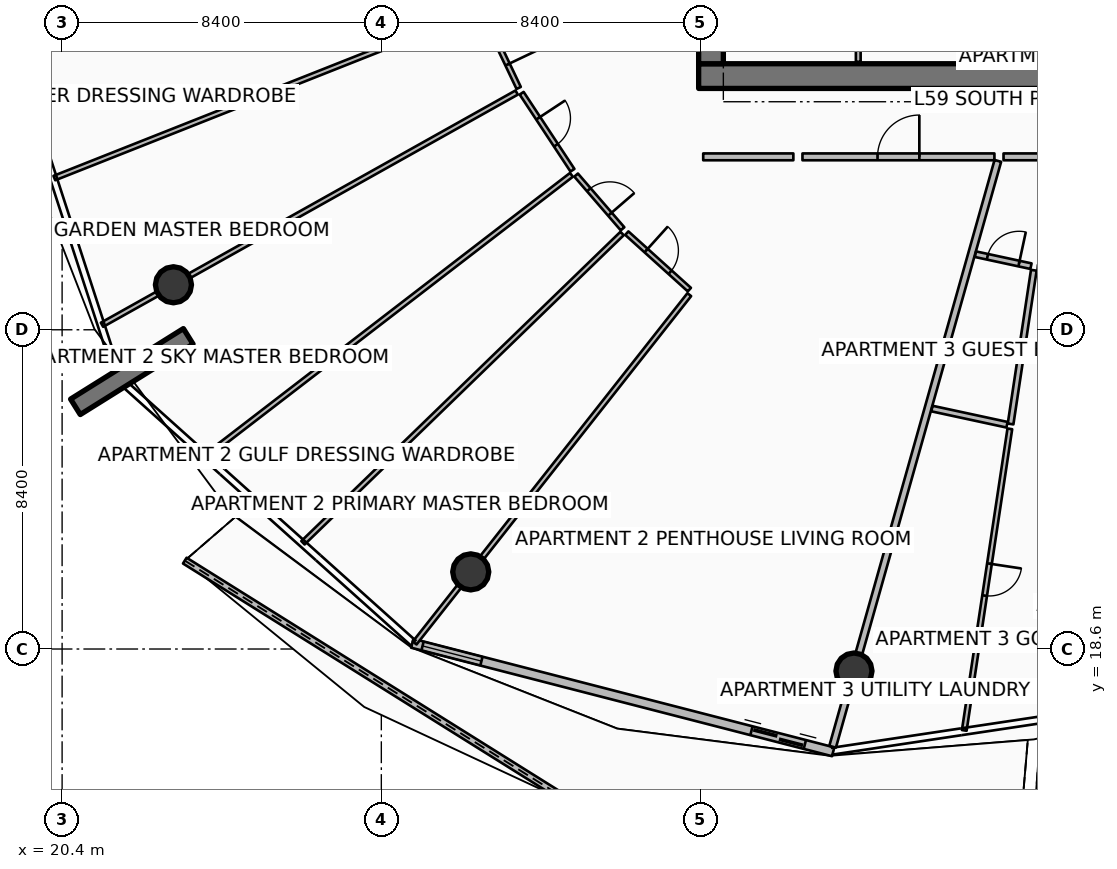
"""IFC4 building model, lengths in metres.
Left out: names, types, materials, properties, quantities, classifications, styles, units other than length and angle.
Written with IfcOpenShell. Run it as: python <this file> out.ifc"""

import sys

from ifc_helpers import new_model, si_unit, direction, frame, frame_2d, origin, origin_2d, place, context, subcontext, project, spatial, polyline, rectangle, circle, outline, extrude, element, fill, save


model = new_model("IFC4")
c1 = context("Model", 3, precision=1e-05, world=origin(), true_north=direction((0.0, 1.0)))
c2 = subcontext(c1, "Body", "Model", "MODEL_VIEW")
j1 = project(units=[si_unit("LENGTHUNIT", "METRE"), si_unit("PLANEANGLEUNIT", "RADIAN")], contexts=[c1])
p1 = place(None, origin())
s1 = spatial("IfcSite", under=j1, at=p1, CompositionType="ELEMENT")
p2 = place(p1, origin())
s2 = spatial("IfcBuilding", under=s1, at=p2, CompositionType="ELEMENT")
p3 = place(p2, frame((0.0, 0.0, 236.7)))
s3 = spatial("IfcBuildingStorey", under=s2, at=p3, CompositionType="ELEMENT", Elevation=236.7)
p4 = place(p3, frame((37.15, 33.675, 0.0), z_axis=(0.0, 0.0, 1.0), x_axis=(1.0, 0.0, 0.0)))
e1 = element("IfcWall", 1, at=p4, inside=s3, PredefinedType="SHEAR", context=c2, shape_type="SweptSolid", body=[
    extrude(rectangle(XDim=9.75, YDim=0.65, at=frame_2d((4.875, 0.0))), origin(), (0.0, 0.0, 1.0), 3.85),
])
p5 = place(p3, frame((37.475, 34.0, 0.0), z_axis=(0.0, 0.0, 1.0), x_axis=(0.0, 1.0, 0.0)))
e2 = element("IfcWall", 2, at=p5, inside=s3, PredefinedType="SHEAR", context=c2, shape_type="SweptSolid", body=[
    extrude(rectangle(XDim=16.0, YDim=0.65, at=frame_2d((8.0, 0.0))), origin(), (0.0, 0.0, 1.0), 3.85),
])
p6 = place(p3, frame((23.719, 26.827, 0.0), z_axis=(0.0, 0.0, 1.0), x_axis=(-0.848033572426, -0.529942506352, 0.0)))
e3 = element("IfcWall", 3, at=p6, inside=s3, PredefinedType="SOLIDWALL", context=c2, shape_type="SweptSolid", body=[
    extrude(rectangle(XDim=3.5, YDim=0.48, at=frame_2d((1.75, 0.0))), origin(), (0.0, 0.0, 1.0), 3.85),
])
for number, where, z_axis, x_axis in (
    (4, (23.33, 28.184, 0.0), (0.0, 0.0, 1.0), (1.0, 0.0, 0.0)),
    (5, (31.153, 20.629, 0.0), (0.0, 0.0, 1.0), (1.0, 0.0, 0.0)),
    (6, (41.237, 18.021, 0.0), (0.0, 0.0, 1.0), (1.0, 0.0, 0.0)),
):
    element("IfcColumn", number, at=place(p3, frame(where, z_axis=z_axis, x_axis=x_axis)), inside=s3, PredefinedType="COLUMN", context=c2, shape_type="SweptSolid", body=[
        extrude(circle(Radius=0.475, at=origin_2d()), origin(), (0.0, 0.0, 1.0), 3.59),
    ])
p7 = place(p3, frame((23.629, 20.926, 0.0), z_axis=(0.0, 0.0, 1.0), x_axis=(0.847743764475, -0.53040598582, 0.0)))
e7 = element("IfcWall", 7, at=p7, inside=s3, PredefinedType="PARAPET", context=c2, shape_type="SweptSolid", body=[
    extrude(outline(polyline([(0.0, 0.0), (12.075, 0.0), (12.075, 1.632), (6.037, 1.418), (0.0, 1.233), (0.0, 0.0)])), frame((0.0, 0.09, 0.0), z_axis=(0.0, -1.0, 0.0), x_axis=(1.0, 0.0, 0.0)), (0.0, 0.0, 1.0), 0.18),
])
p8 = place(p3, frame((45.942, 13.635, 0.0), z_axis=(0.0, 0.0, 1.0), x_axis=(0.962462930889, 0.271413165976, 0.0)))
e8 = element("IfcWall", 8, at=p8, inside=s3, PredefinedType="PARAPET", context=c2, shape_type="SweptSolid", body=[
    extrude(outline(polyline([(0.0, 0.0), (10.611, 0.0), (10.611, 1.632), (5.305, 1.798), (0.0, 1.86), (0.0, 0.0)])), frame((0.0, 0.09, 0.0), z_axis=(0.0, -1.0, 0.0), x_axis=(1.0, 0.0, 0.0)), (0.0, 0.0, 1.0), 0.18),
])
p9 = place(p3, frame((29.614, 18.751, 0.0), z_axis=(0.0, 0.0, 1.0), x_axis=(0.968343758421, -0.249620442927, 0.0)))
e9 = element("IfcWall", 9, at=p9, inside=s3, PredefinedType="SOLIDWALL", context=c2, shape_type="SweptSolid", body=[
    extrude(rectangle(XDim=11.438, YDim=0.24, at=frame_2d((5.719, 0.0))), origin(), (0.0, 0.0, 1.0), 2.54),
])
p10 = place(p9, frame((9.218, 0.0, 0.0)))
e10 = element("IfcOpeningElement", 10, at=p10, cuts=e9, PredefinedType="OPENING", context=c2, shape_type="SweptSolid", body=[
    extrude(rectangle(XDim=1.45, YDim=2.15, at=frame_2d((0.725, 1.075))), frame((0.0, 0.13, 0.0), z_axis=(0.0, -1.0, 0.0), x_axis=(1.0, 0.0, 0.0)), (0.0, 0.0, 1.0), 0.26),
])
p11 = place(p9, frame((0.28, 0.0, 0.65)))
e11 = element("IfcOpeningElement", 11, at=p11, cuts=e9, PredefinedType="OPENING", context=c2, shape_type="SweptSolid", body=[
    extrude(rectangle(XDim=1.6, YDim=1.5, at=frame_2d((0.8, 0.75))), frame((0.0, 0.13, 0.0), z_axis=(0.0, -1.0, 0.0), x_axis=(1.0, 0.0, 0.0)), (0.0, 0.0, 1.0), 0.26),
])
for number, where, z_axis, x_axis in (
    (12, (44.28, 34.05, 0.0), (0.0, 0.0, 1.0), (0.0, 1.0, 0.0)),
    (13, (41.35, 34.05, 0.0), (0.0, 0.0, 1.0), (0.0, 1.0, 0.0)),
):
    element("IfcWall", number, at=place(p3, frame(where, z_axis=z_axis, x_axis=x_axis)), inside=s3, PredefinedType="PARTITIONING", context=c2, shape_type="SweptSolid", body=[
        extrude(rectangle(XDim=2.03, YDim=0.125, at=frame_2d((1.015, 0.0))), origin(), (0.0, 0.0, 1.0), 3.03),
    ])
p12 = place(p3, frame((45.023, 31.444, 0.0), z_axis=(0.0, 0.0, 1.0), x_axis=(-0.271442063103, -0.962454781472, 0.0)))
e14 = element("IfcWall", 14, at=p12, inside=s3, PredefinedType="PARTITIONING", context=c2, shape_type="SweptSolid", body=[
    extrude(rectangle(XDim=16.017, YDim=0.18, at=frame_2d((8.008, 0.0))), origin(), (0.0, 0.0, 1.0), 2.957),
])
p13 = place(p3, frame((39.882, 31.55, 0.0), z_axis=(0.0, 0.0, 1.0), x_axis=(1.0, 0.0, 0.0)))
e15 = element("IfcWall", 15, at=p13, inside=s3, PredefinedType="PARTITIONING", context=c2, shape_type="SweptSolid", body=[
    extrude(rectangle(XDim=5.051, YDim=0.18, at=frame_2d((2.525, 0.0))), origin(), (0.0, 0.0, 1.0), 2.957),
])
p14 = place(p13, frame((1.975, 0.0, 0.0)))
e16 = element("IfcOpeningElement", 16, at=p14, cuts=e15, PredefinedType="OPENING", context=c2, shape_type="SweptSolid", body=[
    extrude(rectangle(XDim=1.1, YDim=2.1, at=frame_2d((0.55, 1.05))), frame((0.0, 0.1, 0.0), z_axis=(0.0, -1.0, 0.0), x_axis=(1.0, 0.0, 0.0)), (0.0, 0.0, 1.0), 0.2),
])
p15 = place(p3, frame((31.344, 35.406, 0.0), z_axis=(0.0, 0.0, 1.0), x_axis=(-0.929772783684, -0.368133903248, 0.0)))
e17 = element("IfcWall", 17, at=p15, inside=s3, PredefinedType="PARTITIONING", context=c2, shape_type="SweptSolid", body=[
    extrude(rectangle(XDim=11.99, YDim=0.125, at=frame_2d((5.995, 0.0))), origin(), (0.0, 0.0, 1.0), 3.03),
])
p16 = place(p3, frame((31.462, 35.366, 0.0), z_axis=(0.0, 0.0, 1.0), x_axis=(0.429382337396, -0.903122809109, 0.0)))
e18 = element("IfcWall", 18, at=p16, inside=s3, PredefinedType="PARTITIONING", context=c2, shape_type="SweptSolid", body=[
    extrude(rectangle(XDim=2.218, YDim=0.125, at=frame_2d((1.109, 0.0))), origin(), (0.0, 0.0, 1.0), 2.957),
])
p17 = place(p16, frame((0.684, 0.0, 0.0)))
e19 = element("IfcOpeningElement", 19, at=p17, cuts=e18, PredefinedType="OPENING", context=c2, shape_type="SweptSolid", body=[
    extrude(rectangle(XDim=0.85, YDim=2.06, at=frame_2d((0.425, 1.03))), frame((0.0, 0.073, 0.0), z_axis=(0.0, -1.0, 0.0), x_axis=(1.0, 0.0, 0.0)), (0.0, 0.0, 1.0), 0.145),
])
p18 = place(p3, frame((37.27, 31.55, 0.0), z_axis=(0.0, 0.0, 1.0), x_axis=(1.0, 0.0, 0.0)))
e20 = element("IfcWall", 20, at=p18, inside=s3, PredefinedType="PARTITIONING", context=c2, shape_type="SweptSolid", body=[
    extrude(rectangle(XDim=2.372, YDim=0.18, at=frame_2d((1.186, 0.0))), origin(), (0.0, 0.0, 1.0), 2.957),
])
p19 = place(p3, frame((32.361, 33.242, 0.0), z_axis=(0.0, 0.0, 1.0), x_axis=(-0.872493698271, -0.488625364137, 0.0)))
e21 = element("IfcWall", 21, at=p19, inside=s3, PredefinedType="PARTITIONING", context=c2, shape_type="SweptSolid", body=[
    extrude(rectangle(XDim=12.506, YDim=0.125, at=frame_2d((6.253, 0.0))), origin(), (0.0, 0.0, 1.0), 2.957),
])
p20 = place(p3, frame((36.903, 27.924, 0.0), z_axis=(0.0, 0.0, 1.0), x_axis=(-0.619090039254, -0.785320013304, 0.0)))
e22 = element("IfcWall", 22, at=p20, inside=s3, PredefinedType="PARTITIONING", context=c2, shape_type="SweptSolid", body=[
    extrude(rectangle(XDim=11.672, YDim=0.125, at=frame_2d((5.836, 0.0))), origin(), (0.0, 0.0, 1.0), 2.957),
])
p21 = place(p3, frame((33.802, 31.076, 0.0), z_axis=(0.0, 0.0, 1.0), x_axis=(-0.792569355896, -0.609781777437, 0.0)))
e23 = element("IfcWall", 23, at=p21, inside=s3, PredefinedType="PARTITIONING", context=c2, shape_type="SweptSolid", body=[
    extrude(rectangle(XDim=12.128, YDim=0.125, at=frame_2d((6.064, 0.0))), origin(), (0.0, 0.0, 1.0), 3.03),
])
p22 = place(p3, frame((35.135, 29.533, 0.0), z_axis=(0.0, 0.0, 1.0), x_axis=(-0.718126422437, -0.695912667939, 0.0)))
e24 = element("IfcWall", 24, at=p22, inside=s3, PredefinedType="PARTITIONING", context=c2, shape_type="SweptSolid", body=[
    extrude(rectangle(XDim=11.694, YDim=0.125, at=frame_2d((5.847, 0.0))), origin(), (0.0, 0.0, 1.0), 3.03),
])
p23 = place(p3, frame((32.493, 33.224, 0.0), z_axis=(0.0, 0.0, 1.0), x_axis=(0.550632023565, -0.834748090519, 0.0)))
e25 = element("IfcWall", 25, at=p23, inside=s3, PredefinedType="PARTITIONING", context=c2, shape_type="SweptSolid", body=[
    extrude(rectangle(XDim=2.427, YDim=0.125, at=frame_2d((1.214, 0.0))), origin(), (0.0, 0.0, 1.0), 2.957),
])
p24 = place(p23, frame((0.789, 0.0, 0.0)))
e26 = element("IfcOpeningElement", 26, at=p24, cuts=e25, PredefinedType="OPENING", context=c2, shape_type="SweptSolid", body=[
    extrude(rectangle(XDim=0.85, YDim=2.06, at=frame_2d((0.425, 1.03))), frame((0.0, 0.073, 0.0), z_axis=(0.0, -1.0, 0.0), x_axis=(1.0, 0.0, 0.0)), (0.0, 0.0, 1.0), 0.145),
])
p25 = place(p3, frame((33.926, 31.07, 0.0), z_axis=(0.0, 0.0, 1.0), x_axis=(0.653895348319, -0.756585007416, 0.0)))
e27 = element("IfcWall", 27, at=p25, inside=s3, PredefinedType="PARTITIONING", context=c2, shape_type="SweptSolid", body=[
    extrude(rectangle(XDim=1.869, YDim=0.125, at=frame_2d((0.934, 0.0))), origin(), (0.0, 0.0, 1.0), 3.03),
])
p26 = place(p25, frame((0.51, 0.0, 0.0)))
e28 = element("IfcOpeningElement", 28, at=p26, cuts=e27, PredefinedType="OPENING", context=c2, shape_type="SweptSolid", body=[
    extrude(rectangle(XDim=0.85, YDim=2.06, at=frame_2d((0.425, 1.03))), frame((0.0, 0.073, 0.0), z_axis=(0.0, -1.0, 0.0), x_axis=(1.0, 0.0, 0.0)), (0.0, 0.0, 1.0), 0.145),
])
p27 = place(p3, frame((35.26, 29.542, 0.0), z_axis=(0.0, 0.0, 1.0), x_axis=(0.742286289791, -0.670082878447, 0.0)))
e29 = element("IfcWall", 29, at=p27, inside=s3, PredefinedType="PARTITIONING", context=c2, shape_type="SweptSolid", body=[
    extrude(rectangle(XDim=2.218, YDim=0.125, at=frame_2d((1.109, 0.0))), origin(), (0.0, 0.0, 1.0), 2.957),
])
p28 = place(p27, frame((0.684, 0.0, 0.0)))
e30 = element("IfcOpeningElement", 30, at=p28, cuts=e29, PredefinedType="OPENING", context=c2, shape_type="SweptSolid", body=[
    extrude(rectangle(XDim=0.85, YDim=2.06, at=frame_2d((0.425, 1.03))), frame((0.0, 0.073, 0.0), z_axis=(0.0, -1.0, 0.0), x_axis=(1.0, 0.0, 0.0)), (0.0, 0.0, 1.0), 0.145),
])
p29 = place(p3, frame((45.173, 31.55, 0.0), z_axis=(0.0, 0.0, 1.0), x_axis=(1.0, 0.0, 0.0)))
e31 = element("IfcWall", 31, at=p29, inside=s3, PredefinedType="PARTITIONING", context=c2, shape_type="SweptSolid", body=[
    extrude(rectangle(XDim=3.944, YDim=0.18, at=frame_2d((1.972, 0.0))), origin(), (0.0, 0.0, 1.0), 2.957),
])
p30 = place(p3, frame((44.434, 28.989, 0.0), z_axis=(0.0, 0.0, 1.0), x_axis=(0.977543483976, -0.21073380587, 0.0)))
e32 = element("IfcWall", 32, at=p30, inside=s3, PredefinedType="PARTITIONING", context=c2, shape_type="SweptSolid", body=[
    extrude(rectangle(XDim=1.494, YDim=0.15, at=frame_2d((0.747, 0.0))), origin(), (0.0, 0.0, 1.0), 2.957),
])
p31 = place(p30, frame((0.322, 0.0, 0.0)))
e33 = element("IfcOpeningElement", 33, at=p31, cuts=e32, PredefinedType="OPENING", context=c2, shape_type="SweptSolid", body=[
    extrude(rectangle(XDim=0.85, YDim=2.06, at=frame_2d((0.425, 1.03))), frame((0.0, 0.085, 0.0), z_axis=(0.0, -1.0, 0.0), x_axis=(1.0, 0.0, 0.0)), (0.0, 0.0, 1.0), 0.17),
])
p32 = place(p3, frame((43.289, 24.927, 0.0), z_axis=(0.0, 0.0, 1.0), x_axis=(0.977523973404, -0.210824290395, 0.0)))
e34 = element("IfcWall", 34, at=p32, inside=s3, PredefinedType="PARTITIONING", context=c2, shape_type="SweptSolid", body=[
    extrude(rectangle(XDim=2.021, YDim=0.15, at=frame_2d((1.01, 0.0))), origin(), (0.0, 0.0, 1.0), 2.957),
])
p33 = place(p3, frame((45.969, 28.566, 0.0), z_axis=(0.0, 0.0, 1.0), x_axis=(-0.149464107942, -0.988767151779, 0.0)))
e35 = element("IfcWall", 35, at=p33, inside=s3, PredefinedType="PARTITIONING", context=c2, shape_type="SweptSolid", body=[
    extrude(rectangle(XDim=4.09, YDim=0.15, at=frame_2d((2.045, 0.0))), origin(), (0.0, 0.0, 1.0), 3.03),
])
p34 = place(p3, frame((45.339, 24.393, 0.0), z_axis=(0.0, 0.0, 1.0), x_axis=(-0.149441267911, -0.988770604056, 0.0)))
e36 = element("IfcWall", 36, at=p34, inside=s3, PredefinedType="PARTITIONING", context=c2, shape_type="SweptSolid", body=[
    extrude(rectangle(XDim=8.025, YDim=0.125, at=frame_2d((4.012, 0.0))), origin(), (0.0, 0.0, 1.0), 3.03),
])
p35 = place(p34, frame((3.587, 0.0, 0.0)))
e37 = element("IfcOpeningElement", 37, at=p35, cuts=e36, PredefinedType="OPENING", context=c2, shape_type="SweptSolid", body=[
    extrude(rectangle(XDim=0.85, YDim=2.06, at=frame_2d((0.425, 1.03))), frame((0.0, 0.073, 0.0), z_axis=(0.0, -1.0, 0.0), x_axis=(1.0, 0.0, 0.0)), (0.0, 0.0, 1.0), 0.145),
])
p36 = place(p10, origin())
e38 = element("IfcDoor", 38, at=p36, inside=s3, OperationType="DOUBLE_DOOR_SLIDING", PredefinedType="DOOR", context=c2, shape_type="SweptSolid", body=[
    extrude(rectangle(XDim=1.45, YDim=2.15, at=frame_2d((0.725, 1.075))), frame((0.0, 0.025, 0.0), z_axis=(0.0, -1.0, 0.0), x_axis=(1.0, 0.0, 0.0)), (0.0, 0.0, 1.0), 0.05),
])
fill(e10, e38)
p37 = place(p11, origin())
e39 = element("IfcWindow", 39, at=p37, inside=s3, PartitioningType="SINGLE_PANEL", PredefinedType="WINDOW", context=c2, shape_type="SweptSolid", body=[
    extrude(rectangle(XDim=1.6, YDim=1.5, at=frame_2d((0.8, 0.75))), frame((0.0, 0.03, 0.0), z_axis=(0.0, -1.0, 0.0), x_axis=(1.0, 0.0, 0.0)), (0.0, 0.0, 1.0), 0.06),
])
fill(e11, e39)
p38 = place(p14, origin())
e40 = element("IfcDoor", 40, at=p38, inside=s3, OperationType="SINGLE_SWING_RIGHT", PredefinedType="DOOR", context=c2, shape_type="SweptSolid", body=[
    extrude(rectangle(XDim=1.1, YDim=2.1, at=frame_2d((0.55, 1.05))), frame((0.0, 0.025, 0.0), z_axis=(0.0, -1.0, 0.0), x_axis=(1.0, 0.0, 0.0)), (0.0, 0.0, 1.0), 0.05),
])
fill(e16, e40)
p39 = place(p17, origin())
e41 = element("IfcDoor", 41, at=p39, inside=s3, OperationType="SINGLE_SWING_RIGHT", PredefinedType="DOOR", context=c2, shape_type="SweptSolid", body=[
    extrude(rectangle(XDim=0.85, YDim=2.06, at=frame_2d((0.425, 1.03))), frame((0.0, 0.025, 0.0), z_axis=(0.0, -1.0, 0.0), x_axis=(1.0, 0.0, 0.0)), (0.0, 0.0, 1.0), 0.05),
])
fill(e19, e41)
p40 = place(p24, origin())
e42 = element("IfcDoor", 42, at=p40, inside=s3, OperationType="SINGLE_SWING_LEFT", PredefinedType="DOOR", context=c2, shape_type="SweptSolid", body=[
    extrude(rectangle(XDim=0.85, YDim=2.06, at=frame_2d((0.425, 1.03))), frame((0.0, 0.025, 0.0), z_axis=(0.0, -1.0, 0.0), x_axis=(1.0, 0.0, 0.0)), (0.0, 0.0, 1.0), 0.05),
])
fill(e26, e42)
p41 = place(p26, origin())
e43 = element("IfcDoor", 43, at=p41, inside=s3, OperationType="SINGLE_SWING_RIGHT", PredefinedType="DOOR", context=c2, shape_type="SweptSolid", body=[
    extrude(rectangle(XDim=0.85, YDim=2.06, at=frame_2d((0.425, 1.03))), frame((0.0, 0.025, 0.0), z_axis=(0.0, -1.0, 0.0), x_axis=(1.0, 0.0, 0.0)), (0.0, 0.0, 1.0), 0.05),
])
fill(e28, e43)
p42 = place(p28, origin())
e44 = element("IfcDoor", 44, at=p42, inside=s3, OperationType="SINGLE_SWING_LEFT", PredefinedType="DOOR", context=c2, shape_type="SweptSolid", body=[
    extrude(rectangle(XDim=0.85, YDim=2.06, at=frame_2d((0.425, 1.03))), frame((0.0, 0.025, 0.0), z_axis=(0.0, -1.0, 0.0), x_axis=(1.0, 0.0, 0.0)), (0.0, 0.0, 1.0), 0.05),
])
fill(e30, e44)
p43 = place(p31, origin())
e45 = element("IfcDoor", 45, at=p43, inside=s3, OperationType="SINGLE_SWING_RIGHT", PredefinedType="DOOR", context=c2, shape_type="SweptSolid", body=[
    extrude(rectangle(XDim=0.85, YDim=2.06, at=frame_2d((0.425, 1.03))), frame((0.0, 0.025, 0.0), z_axis=(0.0, -1.0, 0.0), x_axis=(1.0, 0.0, 0.0)), (0.0, 0.0, 1.0), 0.05),
])
fill(e33, e45)
p44 = place(p35, origin())
e46 = element("IfcDoor", 46, at=p44, inside=s3, OperationType="SINGLE_SWING_LEFT", PredefinedType="DOOR", context=c2, shape_type="SweptSolid", body=[
    extrude(rectangle(XDim=0.85, YDim=2.06, at=frame_2d((0.425, 1.03))), frame((0.0, 0.025, 0.0), z_axis=(0.0, -1.0, 0.0), x_axis=(1.0, 0.0, 0.0)), (0.0, 0.0, 1.0), 0.05),
])
fill(e37, e46)
save(model, sys.argv[1])
